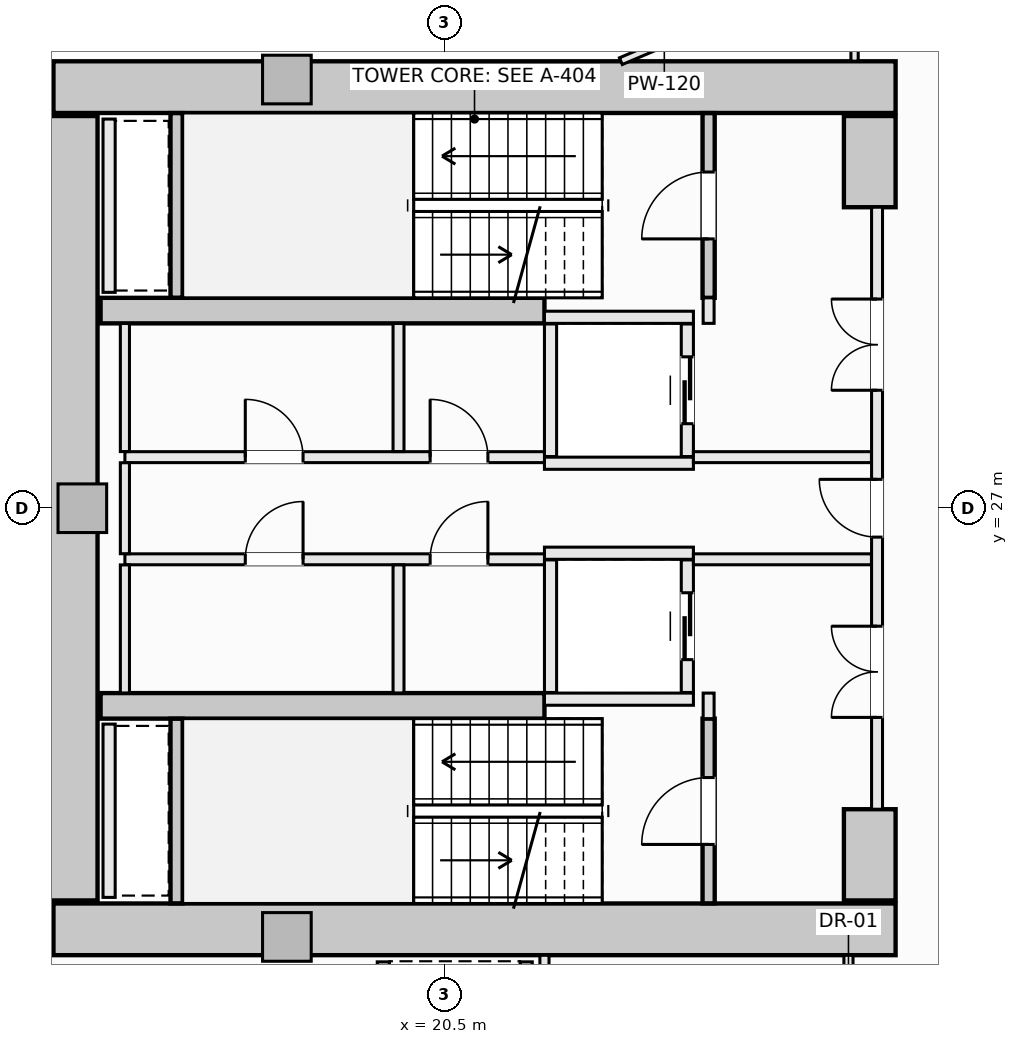
"""IFC4 building model, lengths in metres.
Left out: names, types, materials, properties, quantities, classifications, styles, units other than length and angle.
Written with IfcOpenShell. Run it as: python <this file> out.ifc"""

import sys

from ifc_helpers import new_model, si_unit, direction, frame, frame_2d, origin, origin_2d, place, context, subcontext, project, spatial, rectangle, extrude, element, fill, save


model = new_model("IFC4")
c1 = context("Model", 3, precision=1e-05, world=origin(), true_north=direction((0.0, 1.0)))
c2 = subcontext(c1, "Body", "Model", "MODEL_VIEW")
j1 = project(units=[si_unit("LENGTHUNIT", "METRE"), si_unit("PLANEANGLEUNIT", "RADIAN")], contexts=[c1])
p1 = place(None, origin())
s1 = spatial("IfcSite", under=j1, at=p1, CompositionType="ELEMENT")
p2 = place(p1, origin())
s2 = spatial("IfcBuilding", under=s1, at=p2, CompositionType="ELEMENT")
p3 = place(p2, frame((0.0, 0.0, 41.9)))
s3 = spatial("IfcBuildingStorey", under=s2, at=p3, CompositionType="ELEMENT", Elevation=41.9)
for number, where, z_axis, x_axis in (
    (1, (14.075, 33.925, -0.28), (0.0, 0.0, 1.0), (1.0, 0.0, 0.0)),
    (2, (14.075, 20.075, -0.28), (0.0, 0.0, 1.0), (1.0, 0.0, 0.0)),
):
    element("IfcWall", number, at=place(p3, frame(where, z_axis=z_axis, x_axis=x_axis)), inside=s3, PredefinedType="SHEAR", context=c2, shape_type="SweptSolid", body=[
        extrude(rectangle(XDim=13.85, YDim=0.85, at=frame_2d((6.925, 0.0))), origin(), (0.0, 0.0, 1.0), 3.85),
    ])
p4 = place(p3, frame((14.375, 20.55, -0.28), z_axis=(0.0, 0.0, 1.0), x_axis=(0.0, 1.0, 0.0)))
e3 = element("IfcWall", 3, at=p4, inside=s3, PredefinedType="SHEAR", context=c2, shape_type="SweptSolid", body=[
    extrude(rectangle(XDim=12.9, YDim=0.85, at=frame_2d((6.45, 0.0))), origin(), (0.0, 0.0, 1.0), 3.85),
])
for number, where, z_axis, x_axis in (
    (4, (27.5, 31.95, -0.28), (0.0, 0.0, 1.0), (0.0, 1.0, 0.0)),
    (5, (27.5, 20.55, -0.28), (0.0, 0.0, 1.0), (0.0, 1.0, 0.0)),
):
    element("IfcWall", number, at=place(p3, frame(where, z_axis=z_axis, x_axis=x_axis)), inside=s3, PredefinedType="SHEAR", context=c2, shape_type="SweptSolid", body=[
        extrude(rectangle(XDim=1.5, YDim=0.85, at=frame_2d((0.75, 0.0))), origin(), (0.0, 0.0, 1.0), 3.85),
    ])
for number, where, z_axis, x_axis in (
    (6, (14.85, 30.25, -0.28), (0.0, 0.0, 1.0), (1.0, 0.0, 0.0)),
    (7, (14.85, 23.75, -0.28), (0.0, 0.0, 1.0), (1.0, 0.0, 0.0)),
):
    element("IfcWall", number, at=place(p3, frame(where, z_axis=z_axis, x_axis=x_axis)), inside=s3, PredefinedType="SHEAR", context=c2, shape_type="SweptSolid", body=[
        extrude(rectangle(XDim=7.3, YDim=0.42, at=frame_2d((3.65, 0.0))), origin(), (0.0, 0.0, 1.0), 3.85),
    ])
for number, where, z_axis, x_axis in (
    (8, (17.914, 34.05, -0.28), (0.0, 0.0, 1.0), (1.0, 0.0, 0.0)),
    (9, (14.55, 27.0, -0.28), (0.0, 0.0, 1.0), (1.0, 0.0, 0.0)),
    (10, (17.914, 19.95, -0.28), (0.0, 0.0, 1.0), (1.0, 0.0, 0.0)),
):
    element("IfcColumn", number, at=place(p3, frame(where, z_axis=z_axis, x_axis=x_axis)), inside=s3, PredefinedType="PILASTER", context=c2, shape_type="SweptSolid", body=[
        extrude(rectangle(XDim=0.8, YDim=0.8, at=origin_2d()), origin(), (0.0, 0.0, 1.0), 3.85),
    ])
p5 = place(p3, frame((24.85, 30.46, -0.28), z_axis=(0.0, 0.0, 1.0), x_axis=(0.0, 1.0, 0.0)))
e11 = element("IfcWall", 11, at=p5, inside=s3, PredefinedType="SHEAR", context=c2, shape_type="SweptSolid", body=[
    extrude(rectangle(XDim=3.038, YDim=0.2, at=frame_2d((1.519, 0.0))), origin(), (0.0, 0.0, 1.0), 3.85),
])
p6 = place(p5, frame((0.969, 0.0, 0.28)))
e12 = element("IfcOpeningElement", 12, at=p6, cuts=e11, PredefinedType="OPENING", context=c2, shape_type="SweptSolid", body=[
    extrude(rectangle(XDim=1.1, YDim=2.15, at=frame_2d((0.55, 1.075))), frame((0.0, 0.11, 0.0), z_axis=(0.0, -1.0, 0.0), x_axis=(1.0, 0.0, 0.0)), (0.0, 0.0, 1.0), 0.22),
])
p7 = place(p3, frame((16.1, 30.462, -0.28), z_axis=(0.0, 0.0, 1.0), x_axis=(0.0, 1.0, 0.0)))
e13 = element("IfcWall", 13, at=p7, inside=s3, PredefinedType="SHEAR", context=c2, shape_type="SweptSolid", body=[
    extrude(rectangle(XDim=3.036, YDim=0.2, at=frame_2d((1.518, 0.0))), origin(), (0.0, 0.0, 1.0), 3.85),
])
p8 = place(p3, frame((24.85, 20.502, -0.28), z_axis=(0.0, 0.0, 1.0), x_axis=(0.0, 1.0, 0.0)))
e14 = element("IfcWall", 14, at=p8, inside=s3, PredefinedType="SHEAR", context=c2, shape_type="SweptSolid", body=[
    extrude(rectangle(XDim=3.038, YDim=0.2, at=frame_2d((1.519, 0.0))), origin(), (0.0, 0.0, 1.0), 3.85),
])
p9 = place(p8, frame((0.969, 0.0, 0.28)))
e15 = element("IfcOpeningElement", 15, at=p9, cuts=e14, PredefinedType="OPENING", context=c2, shape_type="SweptSolid", body=[
    extrude(rectangle(XDim=1.1, YDim=2.15, at=frame_2d((0.55, 1.075))), frame((0.0, 0.11, 0.0), z_axis=(0.0, -1.0, 0.0), x_axis=(1.0, 0.0, 0.0)), (0.0, 0.0, 1.0), 0.22),
])
p10 = place(p3, frame((16.1, 20.502, -0.28), z_axis=(0.0, 0.0, 1.0), x_axis=(0.0, 1.0, 0.0)))
e16 = element("IfcWall", 16, at=p10, inside=s3, PredefinedType="SHEAR", context=c2, shape_type="SweptSolid", body=[
    extrude(rectangle(XDim=3.036, YDim=0.2, at=frame_2d((1.518, 0.0))), origin(), (0.0, 0.0, 1.0), 3.85),
])
for number, where, z_axis, x_axis in (
    (17, (22.15, 30.14, 0.0), (0.0, 0.0, 1.0), (1.0, 0.0, 0.0)),
    (18, (22.15, 27.74, 0.0), (0.0, 0.0, 1.0), (1.0, 0.0, 0.0)),
):
    element("IfcWall", number, at=place(p3, frame(where, z_axis=z_axis, x_axis=x_axis)), inside=s3, PredefinedType="SOLIDWALL", context=c2, shape_type="SweptSolid", body=[
        extrude(rectangle(XDim=2.45, YDim=0.2, at=frame_2d((1.225, 0.0))), origin(), (0.0, 0.0, 1.0), 3.57),
    ])
p11 = place(p3, frame((22.25, 27.85, 0.0), z_axis=(0.0, 0.0, 1.0), x_axis=(0.0, 1.0, 0.0)))
e19 = element("IfcWall", 19, at=p11, inside=s3, PredefinedType="SOLIDWALL", context=c2, shape_type="SweptSolid", body=[
    extrude(rectangle(XDim=2.18, YDim=0.2, at=frame_2d((1.09, 0.0))), origin(), (0.0, 0.0, 1.0), 3.57),
])
p12 = place(p3, frame((24.5, 27.85, 0.0), z_axis=(0.0, 0.0, 1.0), x_axis=(0.0, 1.0, 0.0)))
e20 = element("IfcWall", 20, at=p12, inside=s3, PredefinedType="SOLIDWALL", context=c2, shape_type="SweptSolid", body=[
    extrude(rectangle(XDim=2.18, YDim=0.2, at=frame_2d((1.09, 0.0))), origin(), (0.0, 0.0, 1.0), 3.57),
])
p13 = place(p12, frame((0.54, 0.0, 0.0)))
e21 = element("IfcOpeningElement", 21, at=p13, cuts=e20, PredefinedType="OPENING", context=c2, shape_type="SweptSolid", body=[
    extrude(rectangle(XDim=1.1, YDim=2.2, at=frame_2d((0.55, 1.1))), frame((0.0, 0.11, 0.0), z_axis=(0.0, -1.0, 0.0), x_axis=(1.0, 0.0, 0.0)), (0.0, 0.0, 1.0), 0.22),
])
for number, where, z_axis, x_axis in (
    (22, (22.15, 26.26, 0.0), (0.0, 0.0, 1.0), (1.0, 0.0, 0.0)),
    (23, (22.15, 23.86, 0.0), (0.0, 0.0, 1.0), (1.0, 0.0, 0.0)),
):
    element("IfcWall", number, at=place(p3, frame(where, z_axis=z_axis, x_axis=x_axis)), inside=s3, PredefinedType="SOLIDWALL", context=c2, shape_type="SweptSolid", body=[
        extrude(rectangle(XDim=2.45, YDim=0.2, at=frame_2d((1.225, 0.0))), origin(), (0.0, 0.0, 1.0), 3.57),
    ])
p14 = place(p3, frame((22.25, 23.97, 0.0), z_axis=(0.0, 0.0, 1.0), x_axis=(0.0, 1.0, 0.0)))
e24 = element("IfcWall", 24, at=p14, inside=s3, PredefinedType="SOLIDWALL", context=c2, shape_type="SweptSolid", body=[
    extrude(rectangle(XDim=2.18, YDim=0.2, at=frame_2d((1.09, 0.0))), origin(), (0.0, 0.0, 1.0), 3.57),
])
p15 = place(p3, frame((24.5, 23.97, 0.0), z_axis=(0.0, 0.0, 1.0), x_axis=(0.0, 1.0, 0.0)))
e25 = element("IfcWall", 25, at=p15, inside=s3, PredefinedType="SOLIDWALL", context=c2, shape_type="SweptSolid", body=[
    extrude(rectangle(XDim=2.18, YDim=0.2, at=frame_2d((1.09, 0.0))), origin(), (0.0, 0.0, 1.0), 3.57),
])
p16 = place(p15, frame((0.54, 0.0, 0.0)))
e26 = element("IfcOpeningElement", 26, at=p16, cuts=e25, PredefinedType="OPENING", context=c2, shape_type="SweptSolid", body=[
    extrude(rectangle(XDim=1.1, YDim=2.2, at=frame_2d((0.55, 1.1))), frame((0.0, 0.11, 0.0), z_axis=(0.0, -1.0, 0.0), x_axis=(1.0, 0.0, 0.0)), (0.0, 0.0, 1.0), 0.22),
])
for number, where, z_axis, x_axis in (
    (27, (19.5, 17.01, 0.0), (0.0, 0.0, 1.0), (0.0, 1.0, 0.0)),
    (28, (21.85, 17.01, 0.0), (0.0, 0.0, 1.0), (0.0, 1.0, 0.0)),
):
    element("IfcWall", number, at=place(p3, frame(where, z_axis=z_axis, x_axis=x_axis)), inside=s3, PredefinedType="SOLIDWALL", context=c2, shape_type="SweptSolid", body=[
        extrude(rectangle(XDim=2.53, YDim=0.2, at=frame_2d((1.265, 0.0))), origin(), (0.0, 0.0, 1.0), 3.57),
    ])
for number, where, z_axis, x_axis in (
    (29, (14.99, 30.55, 0.0), (0.0, 0.0, 1.0), (0.0, 1.0, 0.0)),
    (30, (14.99, 20.6, 0.0), (0.0, 0.0, 1.0), (0.0, 1.0, 0.0)),
):
    element("IfcWall", number, at=place(p3, frame(where, z_axis=z_axis, x_axis=x_axis)), inside=s3, PredefinedType="SOLIDWALL", context=c2, shape_type="SweptSolid", body=[
        extrude(rectangle(XDim=2.85, YDim=0.2, at=frame_2d((1.425, 0.0))), origin(), (0.0, 0.0, 1.0), 3.57),
    ])
for number, where, z_axis, x_axis in (
    (31, (24.85, 23.54, 0.0), (0.0, 0.0, 1.0), (0.0, 1.0, 0.0)),
    (32, (24.85, 30.04, 0.0), (0.0, 0.0, 1.0), (0.0, 1.0, 0.0)),
):
    element("IfcWall", number, at=place(p3, frame(where, z_axis=z_axis, x_axis=x_axis)), inside=s3, PredefinedType="SOLIDWALL", context=c2, shape_type="SweptSolid", body=[
        extrude(rectangle(XDim=0.42, YDim=0.18, at=frame_2d((0.21, 0.0))), origin(), (0.0, 0.0, 1.0), 3.57),
    ])
p17 = place(p3, frame((27.62, 22.05, 0.0), z_axis=(0.0, 0.0, 1.0), x_axis=(0.0, 1.0, 0.0)))
e33 = element("IfcWall", 33, at=p17, inside=s3, PredefinedType="SOLIDWALL", context=c2, shape_type="SweptSolid", body=[
    extrude(rectangle(XDim=9.9, YDim=0.18, at=frame_2d((4.95, 0.0))), origin(), (0.0, 0.0, 1.0), 2.662),
])
p18 = place(p17, frame((4.475, 0.0, 0.0)))
e34 = element("IfcOpeningElement", 34, at=p18, cuts=e33, PredefinedType="OPENING", context=c2, shape_type="SweptSolid", body=[
    extrude(rectangle(XDim=0.95, YDim=2.1, at=frame_2d((0.475, 1.05))), frame((0.0, 0.1, 0.0), z_axis=(0.0, -1.0, 0.0), x_axis=(1.0, 0.0, 0.0)), (0.0, 0.0, 1.0), 0.2),
])
p19 = place(p17, frame((6.89, 0.0, 0.0)))
e35 = element("IfcOpeningElement", 35, at=p19, cuts=e33, PredefinedType="OPENING", context=c2, shape_type="SweptSolid", body=[
    extrude(rectangle(XDim=1.5, YDim=2.2, at=frame_2d((0.75, 1.1))), frame((0.0, 0.1, 0.0), z_axis=(0.0, -1.0, 0.0), x_axis=(1.0, 0.0, 0.0)), (0.0, 0.0, 1.0), 0.2),
])
p20 = place(p17, frame((1.51, 0.0, 0.0)))
e36 = element("IfcOpeningElement", 36, at=p20, cuts=e33, PredefinedType="OPENING", context=c2, shape_type="SweptSolid", body=[
    extrude(rectangle(XDim=1.5, YDim=2.2, at=frame_2d((0.75, 1.1))), frame((0.0, 0.1, 0.0), z_axis=(0.0, -1.0, 0.0), x_axis=(1.0, 0.0, 0.0)), (0.0, 0.0, 1.0), 0.2),
])
p21 = place(p3, frame((15.25, 27.84, 0.0), z_axis=(0.0, 0.0, 1.0), x_axis=(1.0, 0.0, 0.0)))
e37 = element("IfcWall", 37, at=p21, inside=s3, PredefinedType="SOLIDWALL", context=c2, shape_type="SweptSolid", body=[
    extrude(rectangle(XDim=6.9, YDim=0.18, at=frame_2d((3.45, 0.0))), origin(), (0.0, 0.0, 1.0), 3.57),
])
p22 = place(p21, frame((5.02, 0.0, 0.0)))
e38 = element("IfcOpeningElement", 38, at=p22, cuts=e37, PredefinedType="OPENING", context=c2, shape_type="SweptSolid", body=[
    extrude(rectangle(XDim=0.95, YDim=2.1, at=frame_2d((0.475, 1.05))), frame((0.0, 0.1, 0.0), z_axis=(0.0, -1.0, 0.0), x_axis=(1.0, 0.0, 0.0)), (0.0, 0.0, 1.0), 0.2),
])
p23 = place(p21, frame((1.98, 0.0, 0.0)))
e39 = element("IfcOpeningElement", 39, at=p23, cuts=e37, PredefinedType="OPENING", context=c2, shape_type="SweptSolid", body=[
    extrude(rectangle(XDim=0.95, YDim=2.1, at=frame_2d((0.475, 1.05))), frame((0.0, 0.1, 0.0), z_axis=(0.0, -1.0, 0.0), x_axis=(1.0, 0.0, 0.0)), (0.0, 0.0, 1.0), 0.2),
])
p24 = place(p3, frame((24.6, 27.84, 0.0), z_axis=(0.0, 0.0, 1.0), x_axis=(1.0, 0.0, 0.0)))
e40 = element("IfcWall", 40, at=p24, inside=s3, PredefinedType="SOLIDWALL", context=c2, shape_type="SweptSolid", body=[
    extrude(rectangle(XDim=2.928, YDim=0.18, at=frame_2d((1.464, 0.0))), origin(), (0.0, 0.0, 1.0), 3.57),
])
p25 = place(p3, frame((15.25, 26.16, 0.0), z_axis=(0.0, 0.0, 1.0), x_axis=(1.0, 0.0, 0.0)))
e41 = element("IfcWall", 41, at=p25, inside=s3, PredefinedType="SOLIDWALL", context=c2, shape_type="SweptSolid", body=[
    extrude(rectangle(XDim=6.9, YDim=0.18, at=frame_2d((3.45, 0.0))), origin(), (0.0, 0.0, 1.0), 3.57),
])
p26 = place(p25, frame((5.02, 0.0, 0.0)))
e42 = element("IfcOpeningElement", 42, at=p26, cuts=e41, PredefinedType="OPENING", context=c2, shape_type="SweptSolid", body=[
    extrude(rectangle(XDim=0.95, YDim=2.1, at=frame_2d((0.475, 1.05))), frame((0.0, 0.1, 0.0), z_axis=(0.0, -1.0, 0.0), x_axis=(1.0, 0.0, 0.0)), (0.0, 0.0, 1.0), 0.2),
])
p27 = place(p25, frame((1.98, 0.0, 0.0)))
e43 = element("IfcOpeningElement", 43, at=p27, cuts=e41, PredefinedType="OPENING", context=c2, shape_type="SweptSolid", body=[
    extrude(rectangle(XDim=0.95, YDim=2.1, at=frame_2d((0.475, 1.05))), frame((0.0, 0.1, 0.0), z_axis=(0.0, -1.0, 0.0), x_axis=(1.0, 0.0, 0.0)), (0.0, 0.0, 1.0), 0.2),
])
p28 = place(p3, frame((24.6, 26.16, 0.0), z_axis=(0.0, 0.0, 1.0), x_axis=(1.0, 0.0, 0.0)))
e44 = element("IfcWall", 44, at=p28, inside=s3, PredefinedType="SOLIDWALL", context=c2, shape_type="SweptSolid", body=[
    extrude(rectangle(XDim=2.928, YDim=0.18, at=frame_2d((1.464, 0.0))), origin(), (0.0, 0.0, 1.0), 3.57),
])
p29 = place(p3, frame((15.25, 23.962, 0.0), z_axis=(0.0, 0.0, 1.0), x_axis=(0.0, 1.0, 0.0)))
e45 = element("IfcWall", 45, at=p29, inside=s3, PredefinedType="PARTITIONING", context=c2, shape_type="SweptSolid", body=[
    extrude(rectangle(XDim=2.106, YDim=0.15, at=frame_2d((1.053, 0.0))), origin(), (0.0, 0.0, 1.0), 3.57),
])
p30 = place(p3, frame((15.25, 26.252, 0.0), z_axis=(0.0, 0.0, 1.0), x_axis=(0.0, 1.0, 0.0)))
e46 = element("IfcWall", 46, at=p30, inside=s3, PredefinedType="PARTITIONING", context=c2, shape_type="SweptSolid", body=[
    extrude(rectangle(XDim=1.496, YDim=0.15, at=frame_2d((0.748, 0.0))), origin(), (0.0, 0.0, 1.0), 3.57),
])
p31 = place(p3, frame((15.25, 27.932, 0.0), z_axis=(0.0, 0.0, 1.0), x_axis=(0.0, 1.0, 0.0)))
e47 = element("IfcWall", 47, at=p31, inside=s3, PredefinedType="PARTITIONING", context=c2, shape_type="SweptSolid", body=[
    extrude(rectangle(XDim=2.106, YDim=0.15, at=frame_2d((1.053, 0.0))), origin(), (0.0, 0.0, 1.0), 3.57),
])
for number, where, z_axis, x_axis in (
    (48, (19.75, 23.962, 0.0), (0.0, 0.0, 1.0), (0.0, 1.0, 0.0)),
    (49, (19.75, 27.932, 0.0), (0.0, 0.0, 1.0), (0.0, 1.0, 0.0)),
):
    element("IfcWall", number, at=place(p3, frame(where, z_axis=z_axis, x_axis=x_axis)), inside=s3, PredefinedType="SOLIDWALL", context=c2, shape_type="SweptSolid", body=[
        extrude(rectangle(XDim=2.106, YDim=0.18, at=frame_2d((1.053, 0.0))), origin(), (0.0, 0.0, 1.0), 3.57),
    ])
p32 = place(p3, frame((22.15, 17.127, 0.0), z_axis=(0.0, 0.0, 1.0), x_axis=(0.0, 1.0, 0.0)))
e50 = element("IfcWall", 50, at=p32, inside=s3, PredefinedType="PARTITIONING", context=c2, shape_type="SweptSolid", body=[
    extrude(rectangle(XDim=2.521, YDim=0.15, at=frame_2d((1.26, 0.0))), origin(), (0.0, 0.0, 1.0), 3.57),
])
p33 = place(p3, frame((27.15, 17.127, 0.0), z_axis=(0.0, 0.0, 1.0), x_axis=(0.0, 1.0, 0.0)))
e51 = element("IfcWall", 51, at=p33, inside=s3, PredefinedType="PARTITIONING", context=c2, shape_type="SweptSolid", body=[
    extrude(rectangle(XDim=2.521, YDim=0.15, at=frame_2d((1.26, 0.0))), origin(), (0.0, 0.0, 1.0), 3.57),
])
p34 = place(p33, frame((0.785, 0.0, 0.0)))
e52 = element("IfcOpeningElement", 52, at=p34, cuts=e51, PredefinedType="OPENING", context=c2, shape_type="SweptSolid", body=[
    extrude(rectangle(XDim=0.95, YDim=2.1, at=frame_2d((0.475, 1.05))), frame((0.0, 0.085, 0.0), z_axis=(0.0, -1.0, 0.0), x_axis=(1.0, 0.0, 0.0)), (0.0, 0.0, 1.0), 0.17),
])
p35 = place(p3, frame((27.25, 34.352, 0.0), z_axis=(0.0, 0.0, 1.0), x_axis=(0.0, 1.0, 0.0)))
e53 = element("IfcWall", 53, at=p35, inside=s3, PredefinedType="PARTITIONING", context=c2, shape_type="SweptSolid", body=[
    extrude(rectangle(XDim=0.606, YDim=0.12, at=frame_2d((0.303, 0.0))), origin(), (0.0, 0.0, 1.0), 3.57),
])
p36 = place(p3, frame((23.407, 34.352, 0.0), z_axis=(0.0, 0.0, 1.0), x_axis=(0.920643464024, 0.390404421273, 0.0)))
e54 = element("IfcWall", 54, at=p36, inside=s3, PredefinedType="PARTITIONING", context=c2, shape_type="SweptSolid", body=[
    extrude(rectangle(XDim=1.552, YDim=0.12, at=frame_2d((0.776, 0.0))), origin(), (0.0, 0.0, 1.0), 3.57),
])
p37 = place(p6, origin())
e55 = element("IfcDoor", 55, at=p37, inside=s3, OperationType="SINGLE_SWING_LEFT", PredefinedType="DOOR", context=c2, shape_type="SweptSolid", body=[
    extrude(rectangle(XDim=1.1, YDim=2.15, at=frame_2d((0.55, 1.075))), frame((0.0, 0.025, 0.0), z_axis=(0.0, -1.0, 0.0), x_axis=(1.0, 0.0, 0.0)), (0.0, 0.0, 1.0), 0.05),
])
fill(e12, e55)
p38 = place(p9, origin())
e56 = element("IfcDoor", 56, at=p38, inside=s3, OperationType="SINGLE_SWING_LEFT", PredefinedType="DOOR", context=c2, shape_type="SweptSolid", body=[
    extrude(rectangle(XDim=1.1, YDim=2.15, at=frame_2d((0.55, 1.075))), frame((0.0, 0.025, 0.0), z_axis=(0.0, -1.0, 0.0), x_axis=(1.0, 0.0, 0.0)), (0.0, 0.0, 1.0), 0.05),
])
fill(e15, e56)
p39 = place(p13, origin())
e57 = element("IfcDoor", 57, at=p39, inside=s3, OperationType="SLIDING_TO_LEFT", PredefinedType="DOOR", context=c2, shape_type="SweptSolid", body=[
    extrude(rectangle(XDim=1.1, YDim=2.2, at=frame_2d((0.55, 1.1))), frame((0.0, 0.025, 0.0), z_axis=(0.0, -1.0, 0.0), x_axis=(1.0, 0.0, 0.0)), (0.0, 0.0, 1.0), 0.05),
])
fill(e21, e57)
p40 = place(p16, origin())
e58 = element("IfcDoor", 58, at=p40, inside=s3, OperationType="SLIDING_TO_LEFT", PredefinedType="DOOR", context=c2, shape_type="SweptSolid", body=[
    extrude(rectangle(XDim=1.1, YDim=2.2, at=frame_2d((0.55, 1.1))), frame((0.0, 0.025, 0.0), z_axis=(0.0, -1.0, 0.0), x_axis=(1.0, 0.0, 0.0)), (0.0, 0.0, 1.0), 0.05),
])
fill(e26, e58)
p41 = place(p18, origin())
e59 = element("IfcDoor", 59, at=p41, inside=s3, OperationType="SINGLE_SWING_RIGHT", PredefinedType="DOOR", context=c2, shape_type="SweptSolid", body=[
    extrude(rectangle(XDim=0.95, YDim=2.1, at=frame_2d((0.475, 1.05))), frame((0.0, 0.025, 0.0), z_axis=(0.0, -1.0, 0.0), x_axis=(1.0, 0.0, 0.0)), (0.0, 0.0, 1.0), 0.05),
])
fill(e34, e59)
p42 = place(p19, origin())
e60 = element("IfcDoor", 60, at=p42, inside=s3, OperationType="DOUBLE_DOOR_SINGLE_SWING", PredefinedType="DOOR", context=c2, shape_type="SweptSolid", body=[
    extrude(rectangle(XDim=1.5, YDim=2.2, at=frame_2d((0.75, 1.1))), frame((0.0, 0.025, 0.0), z_axis=(0.0, -1.0, 0.0), x_axis=(1.0, 0.0, 0.0)), (0.0, 0.0, 1.0), 0.05),
])
fill(e35, e60)
p43 = place(p20, origin())
e61 = element("IfcDoor", 61, at=p43, inside=s3, OperationType="DOUBLE_DOOR_SINGLE_SWING", PredefinedType="DOOR", context=c2, shape_type="SweptSolid", body=[
    extrude(rectangle(XDim=1.5, YDim=2.2, at=frame_2d((0.75, 1.1))), frame((0.0, 0.025, 0.0), z_axis=(0.0, -1.0, 0.0), x_axis=(1.0, 0.0, 0.0)), (0.0, 0.0, 1.0), 0.05),
])
fill(e36, e61)
p44 = place(p22, origin())
e62 = element("IfcDoor", 62, at=p44, inside=s3, OperationType="SINGLE_SWING_LEFT", PredefinedType="DOOR", context=c2, shape_type="SweptSolid", body=[
    extrude(rectangle(XDim=0.95, YDim=2.1, at=frame_2d((0.475, 1.05))), frame((0.0, 0.025, 0.0), z_axis=(0.0, -1.0, 0.0), x_axis=(1.0, 0.0, 0.0)), (0.0, 0.0, 1.0), 0.05),
])
fill(e38, e62)
p45 = place(p26, origin())
e63 = element("IfcDoor", 63, at=p45, inside=s3, OperationType="SINGLE_SWING_RIGHT", PredefinedType="DOOR", context=c2, shape_type="SweptSolid", body=[
    extrude(rectangle(XDim=0.95, YDim=2.1, at=frame_2d((0.475, 1.05))), frame((0.0, 0.025, 0.0), z_axis=(0.0, -1.0, 0.0), x_axis=(1.0, 0.0, 0.0)), (0.0, 0.0, 1.0), 0.05),
])
fill(e42, e63)
p46 = place(p23, origin())
e64 = element("IfcDoor", 64, at=p46, inside=s3, OperationType="SINGLE_SWING_LEFT", PredefinedType="DOOR", context=c2, shape_type="SweptSolid", body=[
    extrude(rectangle(XDim=0.95, YDim=2.1, at=frame_2d((0.475, 1.05))), frame((0.0, 0.025, 0.0), z_axis=(0.0, -1.0, 0.0), x_axis=(1.0, 0.0, 0.0)), (0.0, 0.0, 1.0), 0.05),
])
fill(e39, e64)
p47 = place(p27, origin())
e65 = element("IfcDoor", 65, at=p47, inside=s3, OperationType="SINGLE_SWING_RIGHT", PredefinedType="DOOR", context=c2, shape_type="SweptSolid", body=[
    extrude(rectangle(XDim=0.95, YDim=2.1, at=frame_2d((0.475, 1.05))), frame((0.0, 0.025, 0.0), z_axis=(0.0, -1.0, 0.0), x_axis=(1.0, 0.0, 0.0)), (0.0, 0.0, 1.0), 0.05),
])
fill(e43, e65)
save(model, sys.argv[1])
